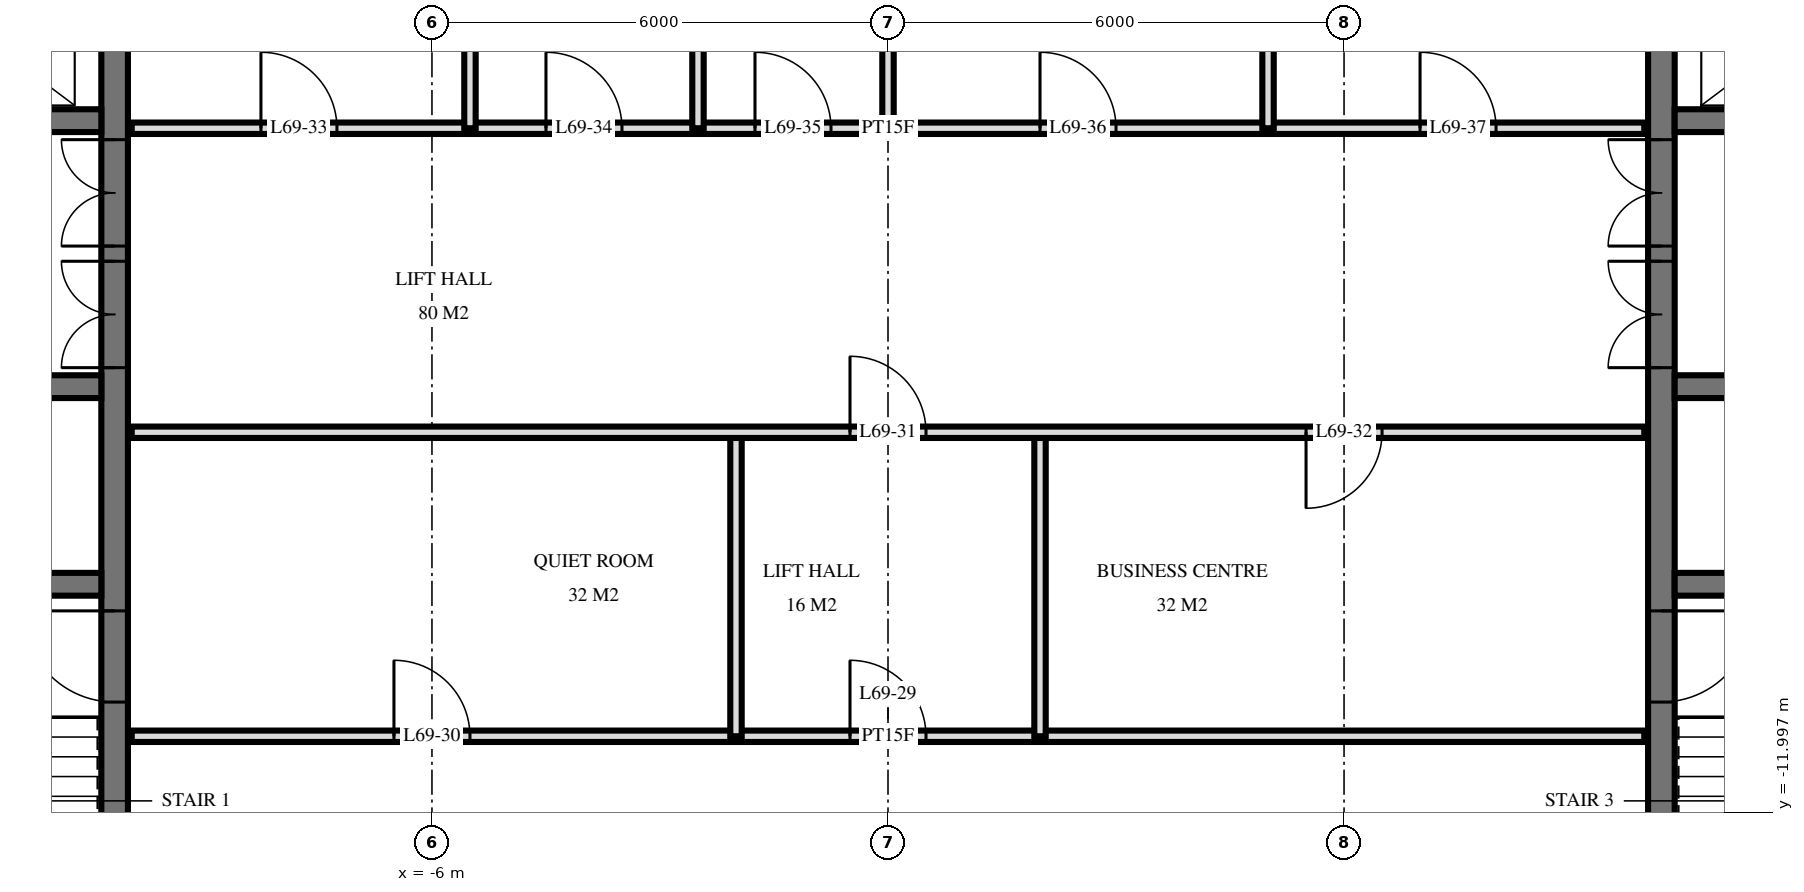
"""IFC4 building model, lengths in metres.
Left out: names, types, materials, properties, quantities, classifications, styles, units other than length and angle.
Written with IfcOpenShell. Run it as: python <this file> out.ifc"""

import sys

from ifc_helpers import new_model, si_unit, direction, frame, frame_2d, origin, place, context, subcontext, project, spatial, rectangle, extrude, element, fill, save


model = new_model("IFC4")
c1 = context("Model", 3, precision=1e-05, world=origin(), true_north=direction((0.0, 1.0)))
c2 = subcontext(c1, "Body", "Model", "MODEL_VIEW")
j1 = project(units=[si_unit("LENGTHUNIT", "METRE"), si_unit("PLANEANGLEUNIT", "RADIAN")], contexts=[c1])
p1 = place(None, origin())
s1 = spatial("IfcSite", under=j1, at=p1, CompositionType="ELEMENT")
p2 = place(p1, origin())
s2 = spatial("IfcBuilding", under=s1, at=p2, CompositionType="ELEMENT")
p3 = place(p2, frame((0.0, 0.0, 263.1)))
s3 = spatial("IfcBuildingStorey", under=s2, at=p3, CompositionType="ELEMENT", Elevation=263.1)
p4 = place(p3, frame((-10.175, -14.55, 0.0), z_axis=(0.0, 0.0, 1.0), x_axis=(0.0, 1.0, 0.0)))
e1 = element("IfcWall", 1, at=p4, inside=s3, PredefinedType="SHEAR", context=c2, shape_type="SweptSolid", body=[
    extrude(rectangle(XDim=14.1, YDim=0.35, at=frame_2d((7.05, 0.0))), origin(), (0.0, 0.0, 1.0), 3.5),
])
p5 = place(p4, frame((8.4, 0.0, 0.0)))
e2 = element("IfcOpeningElement", 2, at=p5, cuts=e1, PredefinedType="OPENING", context=c2, shape_type="SweptSolid", body=[
    extrude(rectangle(XDim=1.4, YDim=2.4, at=frame_2d((0.7, 1.2))), frame((0.0, 0.185, 0.0), z_axis=(0.0, -1.0, 0.0), x_axis=(1.0, 0.0, 0.0)), (0.0, 0.0, 1.0), 0.37),
])
p6 = place(p4, frame((10.0, 0.0, 0.0)))
e3 = element("IfcOpeningElement", 3, at=p6, cuts=e1, PredefinedType="OPENING", context=c2, shape_type="SweptSolid", body=[
    extrude(rectangle(XDim=1.4, YDim=2.4, at=frame_2d((0.7, 1.2))), frame((0.0, 0.185, 0.0), z_axis=(0.0, -1.0, 0.0), x_axis=(1.0, 0.0, 0.0)), (0.0, 0.0, 1.0), 0.37),
])
p7 = place(p4, frame((4.0, 0.0, 0.0)))
e4 = element("IfcOpeningElement", 4, at=p7, cuts=e1, PredefinedType="OPENING", context=c2, shape_type="SweptSolid", body=[
    extrude(rectangle(XDim=1.2, YDim=2.1, at=frame_2d((0.6, 1.05))), frame((0.0, 0.185, 0.0), z_axis=(0.0, -1.0, 0.0), x_axis=(1.0, 0.0, 0.0)), (0.0, 0.0, 1.0), 0.37),
])
p8 = place(p3, frame((-19.05, -2.9, 0.0), z_axis=(0.0, 0.0, 1.0), x_axis=(1.0, 0.0, 0.0)))
e5 = element("IfcWall", 5, at=p8, inside=s3, PredefinedType="SHEAR", context=c2, shape_type="SweptSolid", body=[
    extrude(rectangle(XDim=8.7, YDim=0.3, at=frame_2d((4.35, 0.0))), origin(), (0.0, 0.0, 1.0), 3.5),
])
p9 = place(p8, frame((6.8, 0.0, 0.0)))
e6 = element("IfcOpeningElement", 6, at=p9, cuts=e5, PredefinedType="OPENING", context=c2, shape_type="SweptSolid", body=[
    extrude(rectangle(XDim=1.1, YDim=2.1, at=frame_2d((0.55, 1.05))), frame((0.0, 0.16, 0.0), z_axis=(0.0, -1.0, 0.0), x_axis=(1.0, 0.0, 0.0)), (0.0, 0.0, 1.0), 0.32),
])
p10 = place(p8, frame((3.8, 0.0, 0.0)))
e7 = element("IfcOpeningElement", 7, at=p10, cuts=e5, PredefinedType="OPENING", context=c2, shape_type="SweptSolid", body=[
    extrude(rectangle(XDim=1.1, YDim=2.1, at=frame_2d((0.55, 1.05))), frame((0.0, 0.16, 0.0), z_axis=(0.0, -1.0, 0.0), x_axis=(1.0, 0.0, 0.0)), (0.0, 0.0, 1.0), 0.32),
])
p11 = place(p8, frame((0.9, 0.0, 0.0)))
e8 = element("IfcOpeningElement", 8, at=p11, cuts=e5, PredefinedType="OPENING", context=c2, shape_type="SweptSolid", body=[
    extrude(rectangle(XDim=0.9, YDim=2.1, at=frame_2d((0.45, 1.05))), frame((0.0, 0.16, 0.0), z_axis=(0.0, -1.0, 0.0), x_axis=(1.0, 0.0, 0.0)), (0.0, 0.0, 1.0), 0.32),
])
p12 = place(p3, frame((-19.05, -6.4, 0.0), z_axis=(0.0, 0.0, 1.0), x_axis=(1.0, 0.0, 0.0)))
e9 = element("IfcWall", 9, at=p12, inside=s3, PredefinedType="SHEAR", context=c2, shape_type="SweptSolid", body=[
    extrude(rectangle(XDim=8.7, YDim=0.3, at=frame_2d((4.35, 0.0))), origin(), (0.0, 0.0, 1.0), 3.5),
])
p13 = place(p12, frame((0.8, 0.0, 0.0)))
e10 = element("IfcOpeningElement", 10, at=p13, cuts=e9, PredefinedType="OPENING", context=c2, shape_type="SweptSolid", body=[
    extrude(rectangle(XDim=1.1, YDim=2.1, at=frame_2d((0.55, 1.05))), frame((0.0, 0.16, 0.0), z_axis=(0.0, -1.0, 0.0), x_axis=(1.0, 0.0, 0.0)), (0.0, 0.0, 1.0), 0.32),
])
p14 = place(p3, frame((-19.05, -9.0, 0.0), z_axis=(0.0, 0.0, 1.0), x_axis=(1.0, 0.0, 0.0)))
e11 = element("IfcWall", 11, at=p14, inside=s3, PredefinedType="SHEAR", context=c2, shape_type="SweptSolid", body=[
    extrude(rectangle(XDim=8.7, YDim=0.3, at=frame_2d((4.35, 0.0))), origin(), (0.0, 0.0, 1.0), 3.5),
])
p15 = place(p14, frame((3.8, 0.0, 0.0)))
e12 = element("IfcOpeningElement", 12, at=p15, cuts=e11, PredefinedType="OPENING", context=c2, shape_type="SweptSolid", body=[
    extrude(rectangle(XDim=1.1, YDim=2.1, at=frame_2d((0.55, 1.05))), frame((0.0, 0.16, 0.0), z_axis=(0.0, -1.0, 0.0), x_axis=(1.0, 0.0, 0.0)), (0.0, 0.0, 1.0), 0.32),
])
p16 = place(p3, frame((10.175, -14.55, 0.0), z_axis=(0.0, 0.0, 1.0), x_axis=(0.0, 1.0, 0.0)))
e13 = element("IfcWall", 13, at=p16, inside=s3, PredefinedType="SHEAR", context=c2, shape_type="SweptSolid", body=[
    extrude(rectangle(XDim=14.1, YDim=0.35, at=frame_2d((7.05, 0.0))), origin(), (0.0, 0.0, 1.0), 3.5),
])
p17 = place(p16, frame((8.4, 0.0, 0.0)))
e14 = element("IfcOpeningElement", 14, at=p17, cuts=e13, PredefinedType="OPENING", context=c2, shape_type="SweptSolid", body=[
    extrude(rectangle(XDim=1.4, YDim=2.4, at=frame_2d((0.7, 1.2))), frame((0.0, 0.185, 0.0), z_axis=(0.0, -1.0, 0.0), x_axis=(1.0, 0.0, 0.0)), (0.0, 0.0, 1.0), 0.37),
])
p18 = place(p16, frame((10.0, 0.0, 0.0)))
e15 = element("IfcOpeningElement", 15, at=p18, cuts=e13, PredefinedType="OPENING", context=c2, shape_type="SweptSolid", body=[
    extrude(rectangle(XDim=1.4, YDim=2.4, at=frame_2d((0.7, 1.2))), frame((0.0, 0.185, 0.0), z_axis=(0.0, -1.0, 0.0), x_axis=(1.0, 0.0, 0.0)), (0.0, 0.0, 1.0), 0.37),
])
p19 = place(p16, frame((4.0, 0.0, 0.0)))
e16 = element("IfcOpeningElement", 16, at=p19, cuts=e13, PredefinedType="OPENING", context=c2, shape_type="SweptSolid", body=[
    extrude(rectangle(XDim=1.2, YDim=2.1, at=frame_2d((0.6, 1.05))), frame((0.0, 0.185, 0.0), z_axis=(0.0, -1.0, 0.0), x_axis=(1.0, 0.0, 0.0)), (0.0, 0.0, 1.0), 0.37),
])
p20 = place(p3, frame((10.35, -2.9, 0.0), z_axis=(0.0, 0.0, 1.0), x_axis=(1.0, 0.0, 0.0)))
e17 = element("IfcWall", 17, at=p20, inside=s3, PredefinedType="SHEAR", context=c2, shape_type="SweptSolid", body=[
    extrude(rectangle(XDim=8.7, YDim=0.3, at=frame_2d((4.35, 0.0))), origin(), (0.0, 0.0, 1.0), 3.5),
])
p21 = place(p20, frame((0.8, 0.0, 0.0)))
e18 = element("IfcOpeningElement", 18, at=p21, cuts=e17, PredefinedType="OPENING", context=c2, shape_type="SweptSolid", body=[
    extrude(rectangle(XDim=1.1, YDim=2.1, at=frame_2d((0.55, 1.05))), frame((0.0, 0.16, 0.0), z_axis=(0.0, -1.0, 0.0), x_axis=(1.0, 0.0, 0.0)), (0.0, 0.0, 1.0), 0.32),
])
p22 = place(p20, frame((3.8, 0.0, 0.0)))
e19 = element("IfcOpeningElement", 19, at=p22, cuts=e17, PredefinedType="OPENING", context=c2, shape_type="SweptSolid", body=[
    extrude(rectangle(XDim=1.1, YDim=2.1, at=frame_2d((0.55, 1.05))), frame((0.0, 0.16, 0.0), z_axis=(0.0, -1.0, 0.0), x_axis=(1.0, 0.0, 0.0)), (0.0, 0.0, 1.0), 0.32),
])
p23 = place(p20, frame((6.9, 0.0, 0.0)))
e20 = element("IfcOpeningElement", 20, at=p23, cuts=e17, PredefinedType="OPENING", context=c2, shape_type="SweptSolid", body=[
    extrude(rectangle(XDim=0.9, YDim=2.1, at=frame_2d((0.45, 1.05))), frame((0.0, 0.16, 0.0), z_axis=(0.0, -1.0, 0.0), x_axis=(1.0, 0.0, 0.0)), (0.0, 0.0, 1.0), 0.32),
])
p24 = place(p3, frame((10.35, -6.4, 0.0), z_axis=(0.0, 0.0, 1.0), x_axis=(1.0, 0.0, 0.0)))
e21 = element("IfcWall", 21, at=p24, inside=s3, PredefinedType="SHEAR", context=c2, shape_type="SweptSolid", body=[
    extrude(rectangle(XDim=8.7, YDim=0.3, at=frame_2d((4.35, 0.0))), origin(), (0.0, 0.0, 1.0), 3.5),
])
p25 = place(p24, frame((6.8, 0.0, 0.0)))
e22 = element("IfcOpeningElement", 22, at=p25, cuts=e21, PredefinedType="OPENING", context=c2, shape_type="SweptSolid", body=[
    extrude(rectangle(XDim=1.1, YDim=2.1, at=frame_2d((0.55, 1.05))), frame((0.0, 0.16, 0.0), z_axis=(0.0, -1.0, 0.0), x_axis=(1.0, 0.0, 0.0)), (0.0, 0.0, 1.0), 0.32),
])
p26 = place(p3, frame((10.35, -9.0, 0.0), z_axis=(0.0, 0.0, 1.0), x_axis=(1.0, 0.0, 0.0)))
e23 = element("IfcWall", 23, at=p26, inside=s3, PredefinedType="SHEAR", context=c2, shape_type="SweptSolid", body=[
    extrude(rectangle(XDim=8.7, YDim=0.3, at=frame_2d((4.35, 0.0))), origin(), (0.0, 0.0, 1.0), 3.5),
])
p27 = place(p26, frame((3.8, 0.0, 0.0)))
e24 = element("IfcOpeningElement", 24, at=p27, cuts=e23, PredefinedType="OPENING", context=c2, shape_type="SweptSolid", body=[
    extrude(rectangle(XDim=1.1, YDim=2.1, at=frame_2d((0.55, 1.05))), frame((0.0, 0.16, 0.0), z_axis=(0.0, -1.0, 0.0), x_axis=(1.0, 0.0, 0.0)), (0.0, 0.0, 1.0), 0.32),
])
p28 = place(p3, frame((5.0, -3.0, 0.0), z_axis=(0.0, 0.0, 1.0), x_axis=(0.0, 1.0, 0.0)))
e25 = element("IfcWall", 25, at=p28, inside=s3, PredefinedType="PARTITIONING", context=c2, shape_type="SweptSolid", body=[
    extrude(rectangle(XDim=4.02, YDim=0.15, at=frame_2d((2.01, 0.0))), origin(), (0.0, 0.0, 1.0), 3.22),
])
p29 = place(p3, frame((2.0, -11.0, 0.0), z_axis=(0.0, 0.0, 1.0), x_axis=(0.0, 1.0, 0.0)))
e26 = element("IfcWall", 26, at=p29, inside=s3, PredefinedType="PARTITIONING", context=c2, shape_type="SweptSolid", body=[
    extrude(rectangle(XDim=4.0, YDim=0.15, at=frame_2d((2.0, 0.0))), origin(), (0.0, 0.0, 1.0), 3.22),
])
p30 = place(p3, frame((0.0, -3.0, 0.0), z_axis=(0.0, 0.0, 1.0), x_axis=(0.0, 1.0, 0.0)))
e27 = element("IfcWall", 27, at=p30, inside=s3, PredefinedType="PLUMBINGWALL", context=c2, shape_type="SweptSolid", body=[
    extrude(rectangle(XDim=4.02, YDim=0.15, at=frame_2d((2.01, 0.0))), origin(), (0.0, 0.0, 1.0), 3.22),
])
p31 = place(p3, frame((-2.0, -11.0, 0.0), z_axis=(0.0, 0.0, 1.0), x_axis=(0.0, 1.0, 0.0)))
e28 = element("IfcWall", 28, at=p31, inside=s3, PredefinedType="PARTITIONING", context=c2, shape_type="SweptSolid", body=[
    extrude(rectangle(XDim=4.0, YDim=0.15, at=frame_2d((2.0, 0.0))), origin(), (0.0, 0.0, 1.0), 3.22),
])
for number, where, z_axis, x_axis in (
    (29, (-2.5, -3.0, 0.0), (0.0, 0.0, 1.0), (0.0, 1.0, 0.0)),
    (30, (-5.5, -3.0, 0.0), (0.0, 0.0, 1.0), (0.0, 1.0, 0.0)),
):
    element("IfcWall", number, at=place(p3, frame(where, z_axis=z_axis, x_axis=x_axis)), inside=s3, PredefinedType="PLUMBINGWALL", context=c2, shape_type="SweptSolid", body=[
        extrude(rectangle(XDim=4.02, YDim=0.15, at=frame_2d((2.01, 0.0))), origin(), (0.0, 0.0, 1.0), 3.22),
    ])
p32 = place(p3, frame((-9.95, -11.0, 0.0), z_axis=(0.0, 0.0, 1.0), x_axis=(1.0, 0.0, 0.0)))
e31 = element("IfcWall", 31, at=p32, inside=s3, PredefinedType="PARTITIONING", context=c2, shape_type="SweptSolid", body=[
    extrude(rectangle(XDim=19.9, YDim=0.15, at=frame_2d((9.95, 0.0))), origin(), (0.0, 0.0, 1.0), 3.22),
])
p33 = place(p32, frame((9.45, 0.0, 0.0)))
e32 = element("IfcOpeningElement", 32, at=p33, cuts=e31, PredefinedType="OPENING", context=c2, shape_type="SweptSolid", body=[
    extrude(rectangle(XDim=1.0, YDim=2.1, at=frame_2d((0.5, 1.05))), frame((0.0, 0.085, 0.0), z_axis=(0.0, -1.0, 0.0), x_axis=(1.0, 0.0, 0.0)), (0.0, 0.0, 1.0), 0.17),
])
p34 = place(p32, frame((3.45, 0.0, 0.0)))
e33 = element("IfcOpeningElement", 33, at=p34, cuts=e31, PredefinedType="OPENING", context=c2, shape_type="SweptSolid", body=[
    extrude(rectangle(XDim=1.0, YDim=2.1, at=frame_2d((0.5, 1.05))), frame((0.0, 0.085, 0.0), z_axis=(0.0, -1.0, 0.0), x_axis=(1.0, 0.0, 0.0)), (0.0, 0.0, 1.0), 0.17),
])
p35 = place(p3, frame((-9.95, -7.0, 0.0), z_axis=(0.0, 0.0, 1.0), x_axis=(1.0, 0.0, 0.0)))
e34 = element("IfcWall", 34, at=p35, inside=s3, PredefinedType="PARTITIONING", context=c2, shape_type="SweptSolid", body=[
    extrude(rectangle(XDim=19.9, YDim=0.15, at=frame_2d((9.95, 0.0))), origin(), (0.0, 0.0, 1.0), 3.22),
])
p36 = place(p35, frame((9.45, 0.0, 0.0)))
e35 = element("IfcOpeningElement", 35, at=p36, cuts=e34, PredefinedType="OPENING", context=c2, shape_type="SweptSolid", body=[
    extrude(rectangle(XDim=1.0, YDim=2.1, at=frame_2d((0.5, 1.05))), frame((0.0, 0.085, 0.0), z_axis=(0.0, -1.0, 0.0), x_axis=(1.0, 0.0, 0.0)), (0.0, 0.0, 1.0), 0.17),
])
p37 = place(p35, frame((15.45, 0.0, 0.0)))
e36 = element("IfcOpeningElement", 36, at=p37, cuts=e34, PredefinedType="OPENING", context=c2, shape_type="SweptSolid", body=[
    extrude(rectangle(XDim=1.0, YDim=2.1, at=frame_2d((0.5, 1.05))), frame((0.0, 0.085, 0.0), z_axis=(0.0, -1.0, 0.0), x_axis=(1.0, 0.0, 0.0)), (0.0, 0.0, 1.0), 0.17),
])
p38 = place(p3, frame((-9.95, -3.0, 0.0), z_axis=(0.0, 0.0, 1.0), x_axis=(1.0, 0.0, 0.0)))
e37 = element("IfcWall", 37, at=p38, inside=s3, PredefinedType="PARTITIONING", context=c2, shape_type="SweptSolid", body=[
    extrude(rectangle(XDim=19.9, YDim=0.15, at=frame_2d((9.95, 0.0))), origin(), (0.0, 0.0, 1.0), 3.22),
])
p39 = place(p38, frame((1.7, 0.0, 0.0)))
e38 = element("IfcOpeningElement", 38, at=p39, cuts=e37, PredefinedType="OPENING", context=c2, shape_type="SweptSolid", body=[
    extrude(rectangle(XDim=1.0, YDim=2.1, at=frame_2d((0.5, 1.05))), frame((0.0, 0.085, 0.0), z_axis=(0.0, -1.0, 0.0), x_axis=(1.0, 0.0, 0.0)), (0.0, 0.0, 1.0), 0.17),
])
p40 = place(p38, frame((5.45, 0.0, 0.0)))
e39 = element("IfcOpeningElement", 39, at=p40, cuts=e37, PredefinedType="OPENING", context=c2, shape_type="SweptSolid", body=[
    extrude(rectangle(XDim=1.0, YDim=2.1, at=frame_2d((0.5, 1.05))), frame((0.0, 0.085, 0.0), z_axis=(0.0, -1.0, 0.0), x_axis=(1.0, 0.0, 0.0)), (0.0, 0.0, 1.0), 0.17),
])
p41 = place(p38, frame((8.2, 0.0, 0.0)))
e40 = element("IfcOpeningElement", 40, at=p41, cuts=e37, PredefinedType="OPENING", context=c2, shape_type="SweptSolid", body=[
    extrude(rectangle(XDim=1.0, YDim=2.1, at=frame_2d((0.5, 1.05))), frame((0.0, 0.085, 0.0), z_axis=(0.0, -1.0, 0.0), x_axis=(1.0, 0.0, 0.0)), (0.0, 0.0, 1.0), 0.17),
])
p42 = place(p38, frame((11.95, 0.0, 0.0)))
e41 = element("IfcOpeningElement", 41, at=p42, cuts=e37, PredefinedType="OPENING", context=c2, shape_type="SweptSolid", body=[
    extrude(rectangle(XDim=1.0, YDim=2.1, at=frame_2d((0.5, 1.05))), frame((0.0, 0.085, 0.0), z_axis=(0.0, -1.0, 0.0), x_axis=(1.0, 0.0, 0.0)), (0.0, 0.0, 1.0), 0.17),
])
p43 = place(p38, frame((16.95, 0.0, 0.0)))
e42 = element("IfcOpeningElement", 42, at=p43, cuts=e37, PredefinedType="OPENING", context=c2, shape_type="SweptSolid", body=[
    extrude(rectangle(XDim=1.0, YDim=2.1, at=frame_2d((0.5, 1.05))), frame((0.0, 0.085, 0.0), z_axis=(0.0, -1.0, 0.0), x_axis=(1.0, 0.0, 0.0)), (0.0, 0.0, 1.0), 0.17),
])
p44 = place(p5, origin())
e43 = element("IfcDoor", 43, at=p44, inside=s3, OperationType="DOUBLE_DOOR_SINGLE_SWING", PredefinedType="DOOR", context=c2, shape_type="SweptSolid", body=[
    extrude(rectangle(XDim=1.4, YDim=2.4, at=frame_2d((0.7, 1.2))), frame((0.0, 0.025, 0.0), z_axis=(0.0, -1.0, 0.0), x_axis=(1.0, 0.0, 0.0)), (0.0, 0.0, 1.0), 0.05),
])
fill(e2, e43)
p45 = place(p6, origin())
e44 = element("IfcDoor", 44, at=p45, inside=s3, OperationType="DOUBLE_DOOR_SINGLE_SWING", PredefinedType="DOOR", context=c2, shape_type="SweptSolid", body=[
    extrude(rectangle(XDim=1.4, YDim=2.4, at=frame_2d((0.7, 1.2))), frame((0.0, 0.025, 0.0), z_axis=(0.0, -1.0, 0.0), x_axis=(1.0, 0.0, 0.0)), (0.0, 0.0, 1.0), 0.05),
])
fill(e3, e44)
p46 = place(p7, origin())
e45 = element("IfcDoor", 45, at=p46, inside=s3, OperationType="SINGLE_SWING_LEFT", PredefinedType="DOOR", context=c2, shape_type="SweptSolid", body=[
    extrude(rectangle(XDim=1.2, YDim=2.1, at=frame_2d((0.6, 1.05))), frame((0.0, 0.025, 0.0), z_axis=(0.0, -1.0, 0.0), x_axis=(1.0, 0.0, 0.0)), (0.0, 0.0, 1.0), 0.05),
])
fill(e4, e45)
p47 = place(p17, origin())
e46 = element("IfcDoor", 46, at=p47, inside=s3, OperationType="DOUBLE_DOOR_SINGLE_SWING", PredefinedType="DOOR", context=c2, shape_type="SweptSolid", body=[
    extrude(rectangle(XDim=1.4, YDim=2.4, at=frame_2d((0.7, 1.2))), frame((0.0, 0.025, 0.0), z_axis=(0.0, -1.0, 0.0), x_axis=(1.0, 0.0, 0.0)), (0.0, 0.0, 1.0), 0.05),
])
fill(e14, e46)
p48 = place(p18, origin())
e47 = element("IfcDoor", 47, at=p48, inside=s3, OperationType="DOUBLE_DOOR_SINGLE_SWING", PredefinedType="DOOR", context=c2, shape_type="SweptSolid", body=[
    extrude(rectangle(XDim=1.4, YDim=2.4, at=frame_2d((0.7, 1.2))), frame((0.0, 0.025, 0.0), z_axis=(0.0, -1.0, 0.0), x_axis=(1.0, 0.0, 0.0)), (0.0, 0.0, 1.0), 0.05),
])
fill(e15, e47)
p49 = place(p19, frame((0.6, 0.0, 0.0), z_axis=(0.0, 0.0, 1.0), x_axis=(-1.0, 0.0, 0.0)))
e48 = element("IfcDoor", 48, at=p49, inside=s3, OperationType="SINGLE_SWING_RIGHT", PredefinedType="DOOR", context=c2, shape_type="SweptSolid", body=[
    extrude(rectangle(XDim=1.2, YDim=2.1, at=frame_2d((0.0, 1.05))), frame((0.0, -0.025, 0.0), z_axis=(0.0, 1.0, 0.0), x_axis=(-1.0, 0.0, 0.0)), (0.0, 0.0, 1.0), 0.05),
])
fill(e16, e48)
p50 = place(p33, origin())
e49 = element("IfcDoor", 49, at=p50, inside=s3, OperationType="SINGLE_SWING_RIGHT", PredefinedType="DOOR", context=c2, shape_type="SweptSolid", body=[
    extrude(rectangle(XDim=1.0, YDim=2.1, at=frame_2d((0.5, 1.05))), frame((0.0, 0.025, 0.0), z_axis=(0.0, -1.0, 0.0), x_axis=(1.0, 0.0, 0.0)), (0.0, 0.0, 1.0), 0.05),
])
fill(e32, e49)
p51 = place(p34, origin())
e50 = element("IfcDoor", 50, at=p51, inside=s3, OperationType="SINGLE_SWING_RIGHT", PredefinedType="DOOR", context=c2, shape_type="SweptSolid", body=[
    extrude(rectangle(XDim=1.0, YDim=2.1, at=frame_2d((0.5, 1.05))), frame((0.0, 0.025, 0.0), z_axis=(0.0, -1.0, 0.0), x_axis=(1.0, 0.0, 0.0)), (0.0, 0.0, 1.0), 0.05),
])
fill(e33, e50)
p52 = place(p36, origin())
e51 = element("IfcDoor", 51, at=p52, inside=s3, OperationType="SINGLE_SWING_RIGHT", PredefinedType="DOOR", context=c2, shape_type="SweptSolid", body=[
    extrude(rectangle(XDim=1.0, YDim=2.1, at=frame_2d((0.5, 1.05))), frame((0.0, 0.025, 0.0), z_axis=(0.0, -1.0, 0.0), x_axis=(1.0, 0.0, 0.0)), (0.0, 0.0, 1.0), 0.05),
])
fill(e35, e51)
p53 = place(p37, frame((0.5, 0.0, 0.0), z_axis=(0.0, 0.0, 1.0), x_axis=(-1.0, 0.0, 0.0)))
e52 = element("IfcDoor", 52, at=p53, inside=s3, OperationType="SINGLE_SWING_LEFT", PredefinedType="DOOR", context=c2, shape_type="SweptSolid", body=[
    extrude(rectangle(XDim=1.0, YDim=2.1, at=frame_2d((0.0, 1.05))), frame((0.0, -0.025, 0.0), z_axis=(0.0, 1.0, 0.0), x_axis=(-1.0, 0.0, 0.0)), (0.0, 0.0, 1.0), 0.05),
])
fill(e36, e52)
p54 = place(p39, origin())
e53 = element("IfcDoor", 53, at=p54, inside=s3, OperationType="SINGLE_SWING_RIGHT", PredefinedType="DOOR", context=c2, shape_type="SweptSolid", body=[
    extrude(rectangle(XDim=1.0, YDim=2.1, at=frame_2d((0.5, 1.05))), frame((0.0, 0.025, 0.0), z_axis=(0.0, -1.0, 0.0), x_axis=(1.0, 0.0, 0.0)), (0.0, 0.0, 1.0), 0.05),
])
fill(e38, e53)
p55 = place(p40, origin())
e54 = element("IfcDoor", 54, at=p55, inside=s3, OperationType="SINGLE_SWING_RIGHT", PredefinedType="DOOR", context=c2, shape_type="SweptSolid", body=[
    extrude(rectangle(XDim=1.0, YDim=2.1, at=frame_2d((0.5, 1.05))), frame((0.0, 0.025, 0.0), z_axis=(0.0, -1.0, 0.0), x_axis=(1.0, 0.0, 0.0)), (0.0, 0.0, 1.0), 0.05),
])
fill(e39, e54)
p56 = place(p41, origin())
e55 = element("IfcDoor", 55, at=p56, inside=s3, OperationType="SINGLE_SWING_RIGHT", PredefinedType="DOOR", context=c2, shape_type="SweptSolid", body=[
    extrude(rectangle(XDim=1.0, YDim=2.1, at=frame_2d((0.5, 1.05))), frame((0.0, 0.025, 0.0), z_axis=(0.0, -1.0, 0.0), x_axis=(1.0, 0.0, 0.0)), (0.0, 0.0, 1.0), 0.05),
])
fill(e40, e55)
p57 = place(p42, origin())
e56 = element("IfcDoor", 56, at=p57, inside=s3, OperationType="SINGLE_SWING_RIGHT", PredefinedType="DOOR", context=c2, shape_type="SweptSolid", body=[
    extrude(rectangle(XDim=1.0, YDim=2.1, at=frame_2d((0.5, 1.05))), frame((0.0, 0.025, 0.0), z_axis=(0.0, -1.0, 0.0), x_axis=(1.0, 0.0, 0.0)), (0.0, 0.0, 1.0), 0.05),
])
fill(e41, e56)
p58 = place(p43, origin())
e57 = element("IfcDoor", 57, at=p58, inside=s3, OperationType="SINGLE_SWING_RIGHT", PredefinedType="DOOR", context=c2, shape_type="SweptSolid", body=[
    extrude(rectangle(XDim=1.0, YDim=2.1, at=frame_2d((0.5, 1.05))), frame((0.0, 0.025, 0.0), z_axis=(0.0, -1.0, 0.0), x_axis=(1.0, 0.0, 0.0)), (0.0, 0.0, 1.0), 0.05),
])
fill(e42, e57)
save(model, sys.argv[1])
